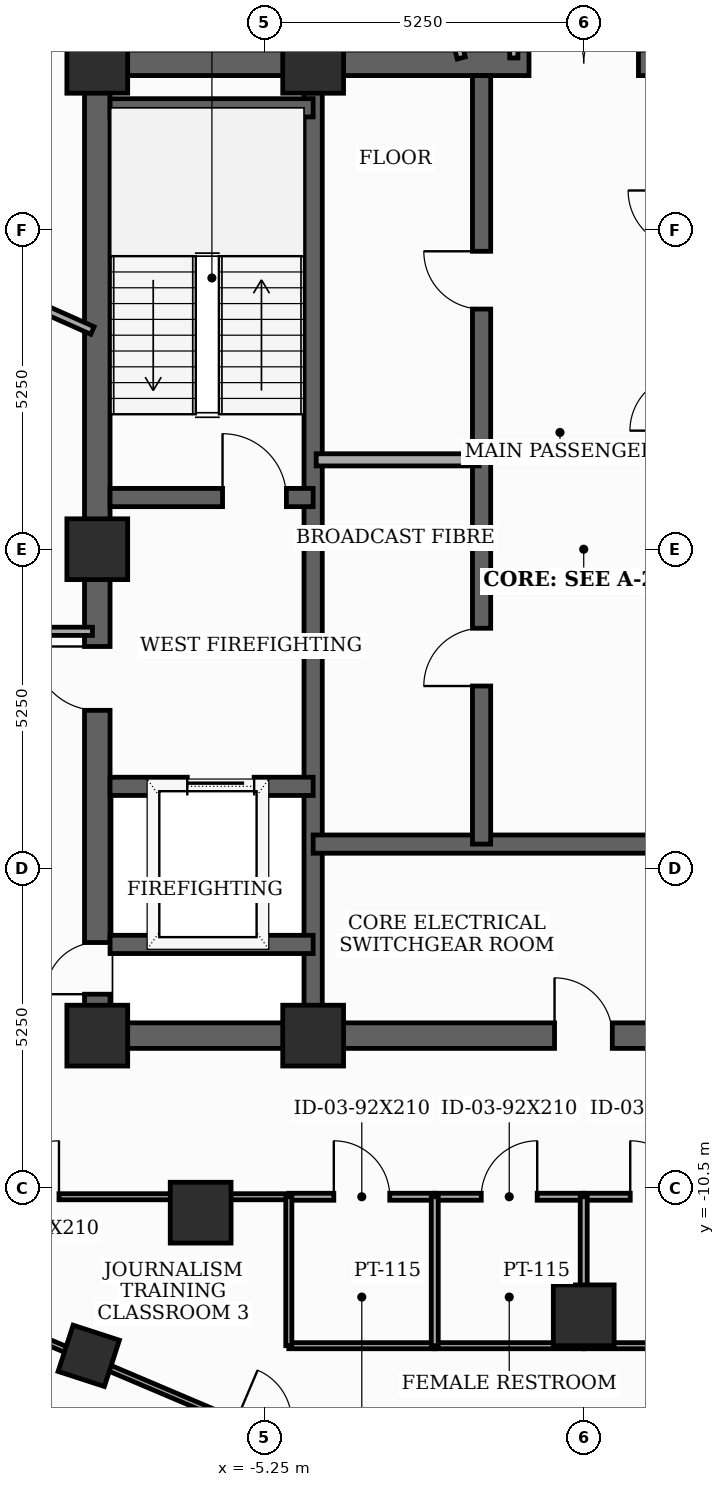
"""IFC4 building model, lengths in metres.
Left out: names, types, materials, properties, quantities, classifications, styles, units other than length and angle.
Written with IfcOpenShell. Run it as: python <this file> out.ifc"""

import sys

from ifc_helpers import new_model, si_unit, direction, frame, frame_2d, origin, origin_2d, place, context, subcontext, project, spatial, rectangle, extrude, element, fill, save


model = new_model("IFC4")
c1 = context("Model", 3, precision=1e-05, world=origin(), true_north=direction((0.0, 1.0)))
c2 = subcontext(c1, "Body", "Model", "MODEL_VIEW")
j1 = project(units=[si_unit("LENGTHUNIT", "METRE"), si_unit("PLANEANGLEUNIT", "RADIAN")], contexts=[c1])
p1 = place(None, origin())
s1 = spatial("IfcSite", under=j1, at=p1, CompositionType="ELEMENT")
p2 = place(p1, origin())
s2 = spatial("IfcBuilding", under=s1, at=p2, CompositionType="ELEMENT")
p3 = place(p2, frame((0.0, 0.0, 283.2)))
s3 = spatial("IfcBuildingStorey", under=s2, at=p3, CompositionType="ELEMENT", Elevation=283.2)
for number, where, z_axis, x_axis in (
    (1, (-8.0, -8.0, 0.0), (0.0, 0.0, 1.0), (1.0, 0.0, 0.0)),
    (2, (-4.45, -8.0, 0.0), (0.0, 0.0, 1.0), (1.0, 0.0, 0.0)),
    (3, (-4.45, 8.0, 0.0), (0.0, 0.0, 1.0), (1.0, 0.0, 0.0)),
    (4, (-8.0, 8.0, 0.0), (0.0, 0.0, 1.0), (1.0, 0.0, 0.0)),
    (5, (-8.0, 0.0, 0.0), (0.0, 0.0, 1.0), (1.0, 0.0, 0.0)),
    (6, (-6.3, -10.912, 0.0), (0.0, 0.0, 1.0), (1.0, 0.0, 0.0)),
    (7, (0.0, -12.6, 0.0), (0.0, 0.0, 1.0), (1.0, 0.0, 0.0)),
):
    element("IfcColumn", number, at=place(p3, frame(where, z_axis=z_axis, x_axis=x_axis)), inside=s3, PredefinedType="COLUMN", context=c2, shape_type="SweptSolid", body=[
        extrude(rectangle(XDim=1.0, YDim=1.0, at=origin_2d()), origin(), (0.0, 0.0, 1.0), 3.7),
    ])
p4 = place(p3, frame((-8.14, -13.266, 0.0), z_axis=(0.0, 0.0, 1.0), x_axis=(0.309016994375, 0.951056516295, 0.0)))
e8 = element("IfcColumn", 8, at=p4, inside=s3, PredefinedType="COLUMN", context=c2, shape_type="SweptSolid", body=[
    extrude(rectangle(XDim=0.8, YDim=0.8, at=origin_2d()), origin(), (0.0, 0.0, 1.0), 3.7),
])
p5 = place(p3, frame((-8.0, -8.0, 0.0), z_axis=(0.0, 0.0, 1.0), x_axis=(0.0, 1.0, 0.0)))
e9 = element("IfcWall", 9, at=p5, inside=s3, PredefinedType="SHEAR", context=c2, shape_type="SweptSolid", body=[
    extrude(rectangle(XDim=16.0, YDim=0.42, at=frame_2d((8.0, 0.0))), origin(), (0.0, 0.0, 1.0), 3.5),
])
p6 = place(p5, frame((0.681, 0.0, 0.0)))
e10 = element("IfcOpeningElement", 10, at=p6, cuts=e9, PredefinedType="OPENING", context=c2, shape_type="SweptSolid", body=[
    extrude(rectangle(XDim=0.85, YDim=2.02, at=frame_2d((0.425, 1.01))), frame((0.0, 0.22, 0.0), z_axis=(0.0, -1.0, 0.0), x_axis=(1.0, 0.0, 0.0)), (0.0, 0.0, 1.0), 0.44),
])
p7 = place(p5, frame((5.35, 0.0, 0.0)))
e11 = element("IfcOpeningElement", 11, at=p7, cuts=e9, PredefinedType="OPENING", context=c2, shape_type="SweptSolid", body=[
    extrude(rectangle(XDim=1.05, YDim=2.15, at=frame_2d((0.525, 1.075))), frame((0.0, 0.22, 0.0), z_axis=(0.0, -1.0, 0.0), x_axis=(1.0, 0.0, 0.0)), (0.0, 0.0, 1.0), 0.44),
])
p8 = place(p3, frame((-8.0, -8.0, 0.0), z_axis=(0.0, 0.0, 1.0), x_axis=(1.0, 0.0, 0.0)))
e12 = element("IfcWall", 12, at=p8, inside=s3, PredefinedType="SHEAR", context=c2, shape_type="SweptSolid", body=[
    extrude(rectangle(XDim=16.0, YDim=0.42, at=frame_2d((8.0, 0.0))), origin(), (0.0, 0.0, 1.0), 3.5),
])
p9 = place(p8, frame((7.52, 0.0, 0.0)))
e13 = element("IfcOpeningElement", 13, at=p9, cuts=e12, PredefinedType="OPENING", context=c2, shape_type="SweptSolid", body=[
    extrude(rectangle(XDim=0.95, YDim=2.1, at=frame_2d((0.475, 1.05))), frame((0.0, 0.22, 0.0), z_axis=(0.0, -1.0, 0.0), x_axis=(1.0, 0.0, 0.0)), (0.0, 0.0, 1.0), 0.44),
])
p10 = place(p3, frame((-8.0, 8.0, 0.0), z_axis=(0.0, 0.0, 1.0), x_axis=(1.0, 0.0, 0.0)))
e14 = element("IfcWall", 14, at=p10, inside=s3, PredefinedType="SHEAR", context=c2, shape_type="SweptSolid", body=[
    extrude(rectangle(XDim=16.0, YDim=0.42, at=frame_2d((8.0, 0.0))), origin(), (0.0, 0.0, 1.0), 3.5),
])
p11 = place(p10, frame((7.1, 0.0, 0.0)))
e15 = element("IfcOpeningElement", 15, at=p11, cuts=e14, PredefinedType="OPENING", context=c2, shape_type="SweptSolid", body=[
    extrude(rectangle(XDim=1.8, YDim=2.15, at=frame_2d((0.9, 1.075))), frame((0.0, 0.22, 0.0), z_axis=(0.0, -1.0, 0.0), x_axis=(1.0, 0.0, 0.0)), (0.0, 0.0, 1.0), 0.44),
])
p12 = place(p3, frame((-4.45, -7.79, 0.0), z_axis=(0.0, 0.0, 1.0), x_axis=(0.0, 1.0, 0.0)))
e16 = element("IfcWall", 16, at=p12, inside=s3, PredefinedType="SHEAR", context=c2, shape_type="SweptSolid", body=[
    extrude(rectangle(XDim=15.58, YDim=0.3, at=frame_2d((7.79, 0.0))), origin(), (0.0, 0.0, 1.0), 3.5),
])
p13 = place(p3, frame((-7.79, 0.85, 0.0), z_axis=(0.0, 0.0, 1.0), x_axis=(1.0, 0.0, 0.0)))
e17 = element("IfcWall", 17, at=p13, inside=s3, PredefinedType="SHEAR", context=c2, shape_type="SweptSolid", body=[
    extrude(rectangle(XDim=3.34, YDim=0.3, at=frame_2d((1.67, 0.0))), origin(), (0.0, 0.0, 1.0), 3.5),
])
p14 = place(p13, frame((1.85, 0.0, 0.0)))
e18 = element("IfcOpeningElement", 18, at=p14, cuts=e17, PredefinedType="OPENING", context=c2, shape_type="SweptSolid", body=[
    extrude(rectangle(XDim=1.05, YDim=2.15, at=frame_2d((0.525, 1.075))), frame((0.0, 0.16, 0.0), z_axis=(0.0, -1.0, 0.0), x_axis=(1.0, 0.0, 0.0)), (0.0, 0.0, 1.0), 0.32),
])
p15 = place(p3, frame((-7.79, 7.26, 0.0), z_axis=(0.0, 0.0, 1.0), x_axis=(1.0, 0.0, 0.0)))
e19 = element("IfcWall", 19, at=p15, inside=s3, PredefinedType="SHEAR", context=c2, shape_type="SweptSolid", body=[
    extrude(rectangle(XDim=3.34, YDim=0.3, at=frame_2d((1.67, 0.0))), origin(), (0.0, 0.0, 1.0), 3.5),
])
p16 = place(p3, frame((-7.79, -3.9, 0.0), z_axis=(0.0, 0.0, 1.0), x_axis=(1.0, 0.0, 0.0)))
e20 = element("IfcWall", 20, at=p16, inside=s3, PredefinedType="SHEAR", context=c2, shape_type="SweptSolid", body=[
    extrude(rectangle(XDim=3.34, YDim=0.3, at=frame_2d((1.67, 0.0))), origin(), (0.0, 0.0, 1.0), 3.5),
])
p17 = place(p16, frame((1.27, 0.0, 0.0)))
e21 = element("IfcOpeningElement", 21, at=p17, cuts=e20, PredefinedType="OPENING", context=c2, shape_type="SweptSolid", body=[
    extrude(rectangle(XDim=1.1, YDim=2.1, at=frame_2d((0.55, 1.05))), frame((0.0, 0.16, 0.0), z_axis=(0.0, -1.0, 0.0), x_axis=(1.0, 0.0, 0.0)), (0.0, 0.0, 1.0), 0.32),
])
p18 = place(p3, frame((-7.79, -6.5, 0.0), z_axis=(0.0, 0.0, 1.0), x_axis=(1.0, 0.0, 0.0)))
e22 = element("IfcWall", 22, at=p18, inside=s3, PredefinedType="SHEAR", context=c2, shape_type="SweptSolid", body=[
    extrude(rectangle(XDim=3.34, YDim=0.3, at=frame_2d((1.67, 0.0))), origin(), (0.0, 0.0, 1.0), 3.5),
])
p19 = place(p3, frame((-4.45, -4.85, 0.0), z_axis=(0.0, 0.0, 1.0), x_axis=(1.0, 0.0, 0.0)))
e23 = element("IfcWall", 23, at=p19, inside=s3, PredefinedType="SHEAR", context=c2, shape_type="SweptSolid", body=[
    extrude(rectangle(XDim=8.9, YDim=0.3, at=frame_2d((4.45, 0.0))), origin(), (0.0, 0.0, 1.0), 3.5),
])
p20 = place(p3, frame((-1.68, -4.85, 0.0), z_axis=(0.0, 0.0, 1.0), x_axis=(0.0, 1.0, 0.0)))
e24 = element("IfcWall", 24, at=p20, inside=s3, PredefinedType="SHEAR", context=c2, shape_type="SweptSolid", body=[
    extrude(rectangle(XDim=12.64, YDim=0.3, at=frame_2d((6.32, 0.0))), origin(), (0.0, 0.0, 1.0), 3.5),
])
p21 = place(p20, frame((2.6, 0.0, 0.0)))
e25 = element("IfcOpeningElement", 25, at=p21, cuts=e24, PredefinedType="OPENING", context=c2, shape_type="SweptSolid", body=[
    extrude(rectangle(XDim=0.95, YDim=2.1, at=frame_2d((0.475, 1.05))), frame((0.0, 0.16, 0.0), z_axis=(0.0, -1.0, 0.0), x_axis=(1.0, 0.0, 0.0)), (0.0, 0.0, 1.0), 0.32),
])
p22 = place(p20, frame((8.8, 0.0, 0.0)))
e26 = element("IfcOpeningElement", 26, at=p22, cuts=e24, PredefinedType="OPENING", context=c2, shape_type="SweptSolid", body=[
    extrude(rectangle(XDim=0.95, YDim=2.1, at=frame_2d((0.475, 1.05))), frame((0.0, 0.16, 0.0), z_axis=(0.0, -1.0, 0.0), x_axis=(1.0, 0.0, 0.0)), (0.0, 0.0, 1.0), 0.32),
])
p23 = place(p3, frame((-4.4, 1.47, 0.0), z_axis=(0.0, 0.0, 1.0), x_axis=(1.0, 0.0, 0.0)))
e27 = element("IfcWall", 27, at=p23, inside=s3, PredefinedType="SOLIDWALL", context=c2, shape_type="SweptSolid", body=[
    extrude(rectangle(XDim=2.68, YDim=0.2, at=frame_2d((1.34, 0.0))), origin(), (0.0, 0.0, 1.0), 3.5),
])
p24 = place(p3, frame((-8.08, -1.35, 0.0), z_axis=(0.0, 0.0, 1.0), x_axis=(-1.0, 0.0, 0.0)))
e28 = element("IfcWall", 28, at=p24, inside=s3, PredefinedType="PARTITIONING", context=c2, shape_type="SweptSolid", body=[
    extrude(rectangle(XDim=2.57, YDim=0.135, at=frame_2d((1.285, 0.0))), origin(), (0.0, 0.0, 1.0), 2.885),
])
p25 = place(p3, frame((-10.15, -10.65, 0.0), z_axis=(0.0, 0.0, 1.0), x_axis=(1.0, 0.0, 0.0)))
e29 = element("IfcWall", 29, at=p25, inside=s3, PredefinedType="MOVABLE", context=c2, shape_type="SweptSolid", body=[
    extrude(rectangle(XDim=5.3, YDim=0.1, at=frame_2d((2.65, 0.0))), origin(), (0.0, 0.0, 1.0), 2.885),
])
p26 = place(p25, frame((0.6, 0.0, 0.0)))
e30 = element("IfcOpeningElement", 30, at=p26, cuts=e29, PredefinedType="OPENING", context=c2, shape_type="SweptSolid", body=[
    extrude(rectangle(XDim=0.92, YDim=2.1, at=frame_2d((0.46, 1.05))), frame((0.0, 0.06, 0.0), z_axis=(0.0, -1.0, 0.0), x_axis=(1.0, 0.0, 0.0)), (0.0, 0.0, 1.0), 0.12),
])
p27 = place(p3, frame((-4.85, -10.65, 0.0), z_axis=(0.0, 0.0, 1.0), x_axis=(1.0, 0.0, 0.0)))
e31 = element("IfcWall", 31, at=p27, inside=s3, PredefinedType="PARTITIONING", context=c2, shape_type="SweptSolid", body=[
    extrude(rectangle(XDim=2.4, YDim=0.115, at=frame_2d((1.2, 0.0))), origin(), (0.0, 0.0, 1.0), 3.5),
])
p28 = place(p27, frame((0.74, 0.0, 0.0)))
e32 = element("IfcOpeningElement", 32, at=p28, cuts=e31, PredefinedType="OPENING", context=c2, shape_type="SweptSolid", body=[
    extrude(rectangle(XDim=0.92, YDim=2.1, at=frame_2d((0.46, 1.05))), frame((0.0, 0.067, 0.0), z_axis=(0.0, -1.0, 0.0), x_axis=(1.0, 0.0, 0.0)), (0.0, 0.0, 1.0), 0.135),
])
p29 = place(p3, frame((-2.45, -10.65, 0.0), z_axis=(0.0, 0.0, 1.0), x_axis=(1.0, 0.0, 0.0)))
e33 = element("IfcWall", 33, at=p29, inside=s3, PredefinedType="PARTITIONING", context=c2, shape_type="SweptSolid", body=[
    extrude(rectangle(XDim=2.45, YDim=0.115, at=frame_2d((1.225, 0.0))), origin(), (0.0, 0.0, 1.0), 2.885),
])
p30 = place(p29, frame((0.765, 0.0, 0.0)))
e34 = element("IfcOpeningElement", 34, at=p30, cuts=e33, PredefinedType="OPENING", context=c2, shape_type="SweptSolid", body=[
    extrude(rectangle(XDim=0.92, YDim=2.1, at=frame_2d((0.46, 1.05))), frame((0.0, 0.067, 0.0), z_axis=(0.0, -1.0, 0.0), x_axis=(1.0, 0.0, 0.0)), (0.0, 0.0, 1.0), 0.135),
])
p31 = place(p3, frame((0.0, -10.65, 0.0), z_axis=(0.0, 0.0, 1.0), x_axis=(1.0, 0.0, 0.0)))
e35 = element("IfcWall", 35, at=p31, inside=s3, PredefinedType="PARTITIONING", context=c2, shape_type="SweptSolid", body=[
    extrude(rectangle(XDim=2.45, YDim=0.115, at=frame_2d((1.225, 0.0))), origin(), (0.0, 0.0, 1.0), 3.5),
])
p32 = place(p31, frame((0.765, 0.0, 0.0)))
e36 = element("IfcOpeningElement", 36, at=p32, cuts=e35, PredefinedType="OPENING", context=c2, shape_type="SweptSolid", body=[
    extrude(rectangle(XDim=0.92, YDim=2.1, at=frame_2d((0.46, 1.05))), frame((0.0, 0.067, 0.0), z_axis=(0.0, -1.0, 0.0), x_axis=(1.0, 0.0, 0.0)), (0.0, 0.0, 1.0), 0.135),
])
p33 = place(p3, frame((-1.15, 10.65, 0.0), z_axis=(0.0, 0.0, 1.0), x_axis=(0.0, -1.0, 0.0)))
e37 = element("IfcWall", 37, at=p33, inside=s3, PredefinedType="PARTITIONING", context=c2, shape_type="SweptSolid", body=[
    extrude(rectangle(XDim=2.57, YDim=0.135, at=frame_2d((1.285, 0.0))), origin(), (0.0, 0.0, 1.0), 2.885),
])
p34 = place(p3, frame((-8.08, 3.597, 0.0), z_axis=(0.0, 0.0, 1.0), x_axis=(-0.913542590258, 0.406743083266, 0.0)))
e38 = element("IfcWall", 38, at=p34, inside=s3, PredefinedType="PARTITIONING", context=c2, shape_type="SweptSolid", body=[
    extrude(rectangle(XDim=18.505, YDim=0.135, at=frame_2d((9.252, 0.0))), origin(), (0.0, 0.0, 1.0), 2.885),
])
p35 = place(p34, frame((8.792, 0.0, 0.0)))
e39 = element("IfcOpeningElement", 39, at=p35, cuts=e38, PredefinedType="OPENING", context=c2, shape_type="SweptSolid", body=[
    extrude(rectangle(XDim=0.92, YDim=2.1, at=frame_2d((0.46, 1.05))), frame((0.0, 0.077, 0.0), z_axis=(0.0, -1.0, 0.0), x_axis=(1.0, 0.0, 0.0)), (0.0, 0.0, 1.0), 0.155),
])
p36 = place(p3, frame((-2.45, -13.1, 0.0), z_axis=(0.0, 0.0, 1.0), x_axis=(-1.0, 0.0, 0.0)))
e40 = element("IfcWall", 40, at=p36, inside=s3, PredefinedType="MOVABLE", context=c2, shape_type="SweptSolid", body=[
    extrude(rectangle(XDim=2.4, YDim=0.1, at=frame_2d((1.2, 0.0))), origin(), (0.0, 0.0, 1.0), 3.5),
])
p37 = place(p3, frame((-4.85, -13.1, 0.0), z_axis=(0.0, 0.0, 1.0), x_axis=(0.0, 1.0, 0.0)))
e41 = element("IfcWall", 41, at=p37, inside=s3, PredefinedType="MOVABLE", context=c2, shape_type="SweptSolid", body=[
    extrude(rectangle(XDim=2.45, YDim=0.1, at=frame_2d((1.225, 0.0))), origin(), (0.0, 0.0, 1.0), 2.885),
])
p38 = place(p3, frame((0.0, -13.1, 0.0), z_axis=(0.0, 0.0, 1.0), x_axis=(-1.0, 0.0, 0.0)))
e42 = element("IfcWall", 42, at=p38, inside=s3, PredefinedType="MOVABLE", context=c2, shape_type="SweptSolid", body=[
    extrude(rectangle(XDim=2.45, YDim=0.1, at=frame_2d((1.225, 0.0))), origin(), (0.0, 0.0, 1.0), 3.035),
])
p39 = place(p3, frame((-9.1, -12.916, 0.0), z_axis=(0.0, 0.0, 1.0), x_axis=(0.920506675175, -0.390726836752, 0.0)))
e43 = element("IfcWall", 43, at=p39, inside=s3, PredefinedType="MOVABLE", context=c2, shape_type="SweptSolid", body=[
    extrude(rectangle(XDim=6.659, YDim=0.1, at=frame_2d((3.33, 0.0))), origin(), (0.0, 0.0, 1.0), 3.035),
])
p40 = place(p39, frame((3.669, 0.0, 0.0)))
e44 = element("IfcOpeningElement", 44, at=p40, cuts=e43, PredefinedType="OPENING", context=c2, shape_type="SweptSolid", body=[
    extrude(rectangle(XDim=0.92, YDim=2.1, at=frame_2d((0.46, 1.05))), frame((0.0, 0.06, 0.0), z_axis=(0.0, -1.0, 0.0), x_axis=(1.0, 0.0, 0.0)), (0.0, 0.0, 1.0), 0.12),
])
p41 = place(p3, frame((2.45, -13.1, 0.0), z_axis=(0.0, 0.0, 1.0), x_axis=(-1.0, 0.0, 0.0)))
e45 = element("IfcWall", 45, at=p41, inside=s3, PredefinedType="MOVABLE", context=c2, shape_type="SweptSolid", body=[
    extrude(rectangle(XDim=2.45, YDim=0.1, at=frame_2d((1.225, 0.0))), origin(), (0.0, 0.0, 1.0), 3.035),
])
for number, where, z_axis, x_axis in (
    (46, (-2.45, -13.1, 0.0), (0.0, 0.0, 1.0), (0.0, 1.0, 0.0)),
    (47, (0.0, -13.1, 0.0), (0.0, 0.0, 1.0), (0.0, 1.0, 0.0)),
):
    element("IfcWall", number, at=place(p3, frame(where, z_axis=z_axis, x_axis=x_axis)), inside=s3, PredefinedType="PARTITIONING", context=c2, shape_type="SweptSolid", body=[
        extrude(rectangle(XDim=2.45, YDim=0.115, at=frame_2d((1.225, 0.0))), origin(), (0.0, 0.0, 1.0), 2.885),
    ])
p42 = place(p3, frame((-3.803, 15.255, 0.0), z_axis=(0.0, 0.0, 1.0), x_axis=(0.241851911951, -0.970313172479, 0.0)))
e48 = element("IfcWall", 48, at=p42, inside=s3, PredefinedType="PARTITIONING", context=c2, shape_type="SweptSolid", body=[
    extrude(rectangle(XDim=7.394, YDim=0.135, at=frame_2d((3.697, 0.0))), origin(), (0.0, 0.0, 1.0), 2.885),
])
p43 = place(p6, origin())
e49 = element("IfcDoor", 49, at=p43, inside=s3, OperationType="SINGLE_SWING_LEFT", PredefinedType="TRAPDOOR", context=c2, shape_type="SweptSolid", body=[
    extrude(rectangle(XDim=0.85, YDim=2.02, at=frame_2d((0.425, 1.01))), frame((0.0, 0.025, 0.0), z_axis=(0.0, -1.0, 0.0), x_axis=(1.0, 0.0, 0.0)), (0.0, 0.0, 1.0), 0.05),
])
fill(e10, e49)
p44 = place(p7, origin())
e50 = element("IfcDoor", 50, at=p44, inside=s3, OperationType="SINGLE_SWING_RIGHT", PredefinedType="DOOR", context=c2, shape_type="SweptSolid", body=[
    extrude(rectangle(XDim=1.05, YDim=2.15, at=frame_2d((0.525, 1.075))), frame((0.0, 0.025, 0.0), z_axis=(0.0, -1.0, 0.0), x_axis=(1.0, 0.0, 0.0)), (0.0, 0.0, 1.0), 0.05),
])
fill(e11, e50)
p45 = place(p9, origin())
e51 = element("IfcDoor", 51, at=p45, inside=s3, OperationType="SINGLE_SWING_LEFT", PredefinedType="DOOR", context=c2, shape_type="SweptSolid", body=[
    extrude(rectangle(XDim=0.95, YDim=2.1, at=frame_2d((0.475, 1.05))), frame((0.0, 0.025, 0.0), z_axis=(0.0, -1.0, 0.0), x_axis=(1.0, 0.0, 0.0)), (0.0, 0.0, 1.0), 0.05),
])
fill(e13, e51)
p46 = place(p11, origin())
e52 = element("IfcDoor", 52, at=p46, inside=s3, OperationType="DOUBLE_DOOR_SINGLE_SWING", PredefinedType="DOOR", context=c2, shape_type="SweptSolid", body=[
    extrude(rectangle(XDim=1.8, YDim=2.15, at=frame_2d((0.9, 1.075))), frame((0.0, 0.025, 0.0), z_axis=(0.0, -1.0, 0.0), x_axis=(1.0, 0.0, 0.0)), (0.0, 0.0, 1.0), 0.05),
])
fill(e15, e52)
p47 = place(p14, origin())
e53 = element("IfcDoor", 53, at=p47, inside=s3, OperationType="SINGLE_SWING_LEFT", PredefinedType="DOOR", context=c2, shape_type="SweptSolid", body=[
    extrude(rectangle(XDim=1.05, YDim=2.15, at=frame_2d((0.525, 1.075))), frame((0.0, 0.025, 0.0), z_axis=(0.0, -1.0, 0.0), x_axis=(1.0, 0.0, 0.0)), (0.0, 0.0, 1.0), 0.05),
])
fill(e18, e53)
p48 = place(p17, origin())
e54 = element("IfcDoor", 54, at=p48, inside=s3, OperationType="SLIDING_TO_LEFT", PredefinedType="DOOR", context=c2, shape_type="SweptSolid", body=[
    extrude(rectangle(XDim=1.1, YDim=2.1, at=frame_2d((0.55, 1.05))), frame((0.0, 0.025, 0.0), z_axis=(0.0, -1.0, 0.0), x_axis=(1.0, 0.0, 0.0)), (0.0, 0.0, 1.0), 0.05),
])
fill(e21, e54)
p49 = place(p21, origin())
e55 = element("IfcDoor", 55, at=p49, inside=s3, OperationType="SINGLE_SWING_LEFT", PredefinedType="DOOR", context=c2, shape_type="SweptSolid", body=[
    extrude(rectangle(XDim=0.95, YDim=2.1, at=frame_2d((0.475, 1.05))), frame((0.0, 0.025, 0.0), z_axis=(0.0, -1.0, 0.0), x_axis=(1.0, 0.0, 0.0)), (0.0, 0.0, 1.0), 0.05),
])
fill(e25, e55)
p50 = place(p22, origin())
e56 = element("IfcDoor", 56, at=p50, inside=s3, OperationType="SINGLE_SWING_RIGHT", PredefinedType="DOOR", context=c2, shape_type="SweptSolid", body=[
    extrude(rectangle(XDim=0.95, YDim=2.1, at=frame_2d((0.475, 1.05))), frame((0.0, 0.025, 0.0), z_axis=(0.0, -1.0, 0.0), x_axis=(1.0, 0.0, 0.0)), (0.0, 0.0, 1.0), 0.05),
])
fill(e26, e56)
p51 = place(p26, origin())
e57 = element("IfcDoor", 57, at=p51, inside=s3, OperationType="SINGLE_SWING_RIGHT", PredefinedType="DOOR", context=c2, shape_type="SweptSolid", body=[
    extrude(rectangle(XDim=0.92, YDim=2.1, at=frame_2d((0.46, 1.05))), frame((0.0, 0.025, 0.0), z_axis=(0.0, -1.0, 0.0), x_axis=(1.0, 0.0, 0.0)), (0.0, 0.0, 1.0), 0.05),
])
fill(e30, e57)
p52 = place(p28, origin())
e58 = element("IfcDoor", 58, at=p52, inside=s3, OperationType="SINGLE_SWING_LEFT", PredefinedType="DOOR", context=c2, shape_type="SweptSolid", body=[
    extrude(rectangle(XDim=0.92, YDim=2.1, at=frame_2d((0.46, 1.05))), frame((0.0, 0.025, 0.0), z_axis=(0.0, -1.0, 0.0), x_axis=(1.0, 0.0, 0.0)), (0.0, 0.0, 1.0), 0.05),
])
fill(e32, e58)
p53 = place(p30, origin())
e59 = element("IfcDoor", 59, at=p53, inside=s3, OperationType="SINGLE_SWING_RIGHT", PredefinedType="DOOR", context=c2, shape_type="SweptSolid", body=[
    extrude(rectangle(XDim=0.92, YDim=2.1, at=frame_2d((0.46, 1.05))), frame((0.0, 0.025, 0.0), z_axis=(0.0, -1.0, 0.0), x_axis=(1.0, 0.0, 0.0)), (0.0, 0.0, 1.0), 0.05),
])
fill(e34, e59)
p54 = place(p32, origin())
e60 = element("IfcDoor", 60, at=p54, inside=s3, OperationType="SINGLE_SWING_LEFT", PredefinedType="DOOR", context=c2, shape_type="SweptSolid", body=[
    extrude(rectangle(XDim=0.92, YDim=2.1, at=frame_2d((0.46, 1.05))), frame((0.0, 0.025, 0.0), z_axis=(0.0, -1.0, 0.0), x_axis=(1.0, 0.0, 0.0)), (0.0, 0.0, 1.0), 0.05),
])
fill(e36, e60)
save(model, sys.argv[1])
